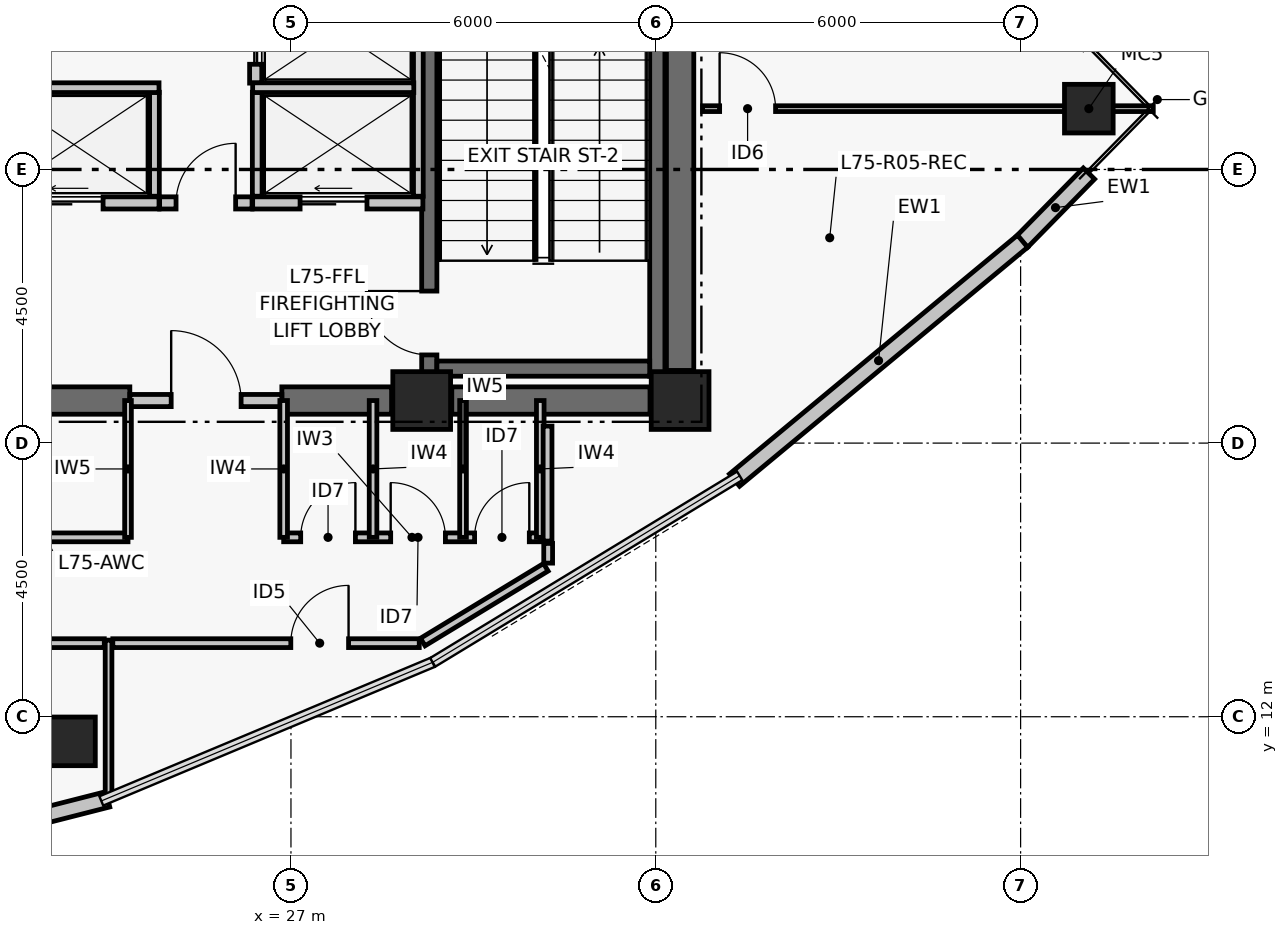
"""IFC4 building model, lengths in metres.
Left out: names, types, materials, properties, quantities, classifications, styles, units other than length and angle.
Written with IfcOpenShell. Run it as: python <this file> out.ifc"""

import sys

from ifc_helpers import new_model, si_unit, direction, frame, frame_2d, origin, origin_2d, place, context, subcontext, project, spatial, rectangle, hollow_rectangle, extrude, element, fill, save


model = new_model("IFC4")
c1 = context("Model", 3, precision=1e-05, world=origin(), true_north=direction((0.0, 1.0)))
c2 = subcontext(c1, "Body", "Model", "MODEL_VIEW")
j1 = project(units=[si_unit("LENGTHUNIT", "METRE"), si_unit("PLANEANGLEUNIT", "RADIAN")], contexts=[c1])
p1 = place(None, origin())
s1 = spatial("IfcSite", under=j1, at=p1, CompositionType="ELEMENT")
p2 = place(p1, origin())
s2 = spatial("IfcBuilding", under=s1, at=p2, CompositionType="ELEMENT")
p3 = place(p2, frame((0.0, 0.0, 295.5)))
s3 = spatial("IfcBuildingStorey", under=s2, at=p3, CompositionType="ELEMENT", Elevation=295.5)
for number, where, z_axis, x_axis in (
    (1, (29.15, 17.2, 0.0), (0.0, 0.0, 1.0), (1.0, 0.0, 0.0)),
    (2, (33.4, 17.2, 0.0), (0.0, 0.0, 1.0), (1.0, 0.0, 0.0)),
):
    element("IfcColumn", number, at=place(p3, frame(where, z_axis=z_axis, x_axis=x_axis)), inside=s3, PredefinedType="COLUMN", context=c2, shape_type="SweptSolid", body=[
        extrude(rectangle(XDim=0.95, YDim=0.95, at=origin_2d()), origin(), (0.0, 0.0, 1.0), 3.72),
    ])
p4 = place(p3, frame((22.545, 17.2, 0.0), z_axis=(0.0, 0.0, 1.0), x_axis=(1.0, 0.0, 0.0)))
e3 = element("IfcWall", 3, at=p4, inside=s3, PredefinedType="SHEAR", context=c2, shape_type="SweptSolid", body=[
    extrude(rectangle(XDim=1.805, YDim=0.45, at=frame_2d((0.903, 0.0))), origin(), (0.0, 0.0, 1.0), 3.44),
])
p5 = place(p3, frame((26.85, 17.2, 0.0), z_axis=(0.0, 0.0, 1.0), x_axis=(1.0, 0.0, 0.0)))
e4 = element("IfcWall", 4, at=p5, inside=s3, PredefinedType="SHEAR", context=c2, shape_type="SweptSolid", body=[
    extrude(rectangle(XDim=1.805, YDim=0.45, at=frame_2d((0.902, 0.0))), origin(), (0.0, 0.0, 1.0), 3.44),
])
p6 = place(p3, frame((29.645, 17.2, 0.0), z_axis=(0.0, 0.0, 1.0), x_axis=(1.0, 0.0, 0.0)))
e5 = element("IfcWall", 5, at=p6, inside=s3, PredefinedType="SHEAR", context=c2, shape_type="SweptSolid", body=[
    extrude(rectangle(XDim=3.26, YDim=0.45, at=frame_2d((1.63, 0.0))), origin(), (0.0, 0.0, 1.0), 3.44),
])
p7 = place(p3, frame((33.4, 17.695, 0.0), z_axis=(0.0, 0.0, 1.0), x_axis=(0.0, 1.0, 0.0)))
e6 = element("IfcWall", 6, at=p7, inside=s3, PredefinedType="SHEAR", context=c2, shape_type="SweptSolid", body=[
    extrude(rectangle(XDim=8.61, YDim=0.45, at=frame_2d((4.305, 0.0))), origin(), (0.0, 0.0, 1.0), 3.44),
])
p8 = place(p3, frame((29.275, 17.6, 0.0), z_axis=(0.0, 0.0, 1.0), x_axis=(0.0, 1.0, 0.0)))
e7 = element("IfcWall", 7, at=p8, inside=s3, PredefinedType="SHEAR", context=c2, shape_type="SweptSolid", body=[
    extrude(rectangle(XDim=8.8, YDim=0.25, at=frame_2d((4.4, 0.0))), origin(), (0.0, 0.0, 1.0), 3.44),
])
p9 = place(p8, frame((0.35, 0.0, 0.0)))
e8 = element("IfcOpeningElement", 8, at=p9, cuts=e7, PredefinedType="OPENING", context=c2, shape_type="SweptSolid", body=[
    extrude(rectangle(XDim=1.05, YDim=2.08, at=frame_2d((0.525, 1.04))), frame((0.0, 0.135, 0.0), z_axis=(0.0, -1.0, 0.0), x_axis=(1.0, 0.0, 0.0)), (0.0, 0.0, 1.0), 0.27),
])
p10 = place(p3, frame((33.025, 17.6, 0.0), z_axis=(0.0, 0.0, 1.0), x_axis=(0.0, 1.0, 0.0)))
e9 = element("IfcWall", 9, at=p10, inside=s3, PredefinedType="SHEAR", context=c2, shape_type="SweptSolid", body=[
    extrude(rectangle(XDim=8.8, YDim=0.25, at=frame_2d((4.4, 0.0))), origin(), (0.0, 0.0, 1.0), 3.44),
])
p11 = place(p3, frame((29.4, 17.725, 0.0), z_axis=(0.0, 0.0, 1.0), x_axis=(1.0, 0.0, 0.0)))
e10 = element("IfcWall", 10, at=p11, inside=s3, PredefinedType="SHEAR", context=c2, shape_type="SweptSolid", body=[
    extrude(rectangle(XDim=3.5, YDim=0.25, at=frame_2d((1.75, 0.0))), origin(), (0.0, 0.0, 1.0), 3.44),
])
for number, where, z_axis, x_axis in (
    (11, (40.122, 22.0, 0.0), (0.0, 0.0, 1.0), (1.0, 0.0, 0.0)),
    (12, (23.382, 11.595, 0.0), (0.0, 0.0, 1.0), (1.0, 0.0, 0.0)),
):
    element("IfcColumn", number, at=place(p3, frame(where, z_axis=z_axis, x_axis=x_axis)), inside=s3, PredefinedType="COLUMN", context=c2, shape_type="SweptSolid", body=[
        extrude(hollow_rectangle(XDim=0.8, YDim=0.8, WallThickness=0.035, at=origin_2d()), origin(), (0.0, 0.0, 1.0), 3.72),
    ])
p12 = place(p3, frame((40.124, 20.933, 0.0), z_axis=(0.0, 0.0, 1.0), x_axis=(-0.700470648387, -0.71368121087, 0.0)))
e13 = element("IfcWall", 13, at=p12, inside=s3, PredefinedType="PARTITIONING", context=c2, shape_type="SweptSolid", body=[
    extrude(rectangle(XDim=1.571, YDim=0.26, at=frame_2d((0.785, 0.0))), origin(), (0.0, 0.0, 1.0), 3.44),
])
p13 = place(p3, frame((23.988, 10.642, 0.0), z_axis=(0.0, 0.0, 1.0), x_axis=(-0.968988278672, -0.247106689096, 0.0)))
e14 = element("IfcWall", 14, at=p13, inside=s3, PredefinedType="PARTITIONING", context=c2, shape_type="SweptSolid", body=[
    extrude(rectangle(XDim=6.154, YDim=0.26, at=frame_2d((3.077, 0.0))), origin(), (0.0, 0.0, 1.0), 3.44),
])
p14 = place(p3, frame((39.032, 19.82, 0.0), z_axis=(0.0, 0.0, 1.0), x_axis=(-0.769779830138, -0.638309496337, 0.0)))
e15 = element("IfcWall", 15, at=p14, inside=s3, PredefinedType="PARTITIONING", context=c2, shape_type="SweptSolid", body=[
    extrude(rectangle(XDim=6.154, YDim=0.26, at=frame_2d((3.077, 0.0))), origin(), (0.0, 0.0, 1.0), 3.44),
])
p15 = place(p3, frame((24.35, 17.2, 0.0), z_axis=(0.0, 0.0, 1.0), x_axis=(1.0, 0.0, 0.0)))
e16 = element("IfcWall", 16, at=p15, inside=s3, PredefinedType="PARTITIONING", context=c2, shape_type="SweptSolid", body=[
    extrude(rectangle(XDim=2.5, YDim=0.2, at=frame_2d((1.25, 0.0))), origin(), (0.0, 0.0, 1.0), 2.57),
])
p16 = place(p15, frame((0.68, 0.0, 0.0)))
e17 = element("IfcOpeningElement", 17, at=p16, cuts=e16, PredefinedType="OPENING", context=c2, shape_type="SweptSolid", body=[
    extrude(rectangle(XDim=1.15, YDim=2.08, at=frame_2d((0.575, 1.04))), frame((0.0, 0.11, 0.0), z_axis=(0.0, -1.0, 0.0), x_axis=(1.0, 0.0, 0.0)), (0.0, 0.0, 1.0), 0.22),
])
p17 = place(p3, frame((24.84, 20.45, 0.0), z_axis=(0.0, 0.0, 1.0), x_axis=(1.0, 0.0, 0.0)))
e18 = element("IfcWall", 18, at=p17, inside=s3, PredefinedType="PARTITIONING", context=c2, shape_type="SweptSolid", body=[
    extrude(rectangle(XDim=1.52, YDim=0.2, at=frame_2d((0.76, 0.0))), origin(), (0.0, 0.0, 1.0), 3.44),
])
p18 = place(p17, frame((0.27, 0.0, 0.0)))
e19 = element("IfcOpeningElement", 19, at=p18, cuts=e18, PredefinedType="OPENING", context=c2, shape_type="SweptSolid", body=[
    extrude(rectangle(XDim=0.98, YDim=2.06, at=frame_2d((0.49, 1.03))), frame((0.0, 0.11, 0.0), z_axis=(0.0, -1.0, 0.0), x_axis=(1.0, 0.0, 0.0)), (0.0, 0.0, 1.0), 0.22),
])
p19 = place(p3, frame((22.03, 20.45, 0.0), z_axis=(0.0, 0.0, 1.0), x_axis=(1.0, 0.0, 0.0)))
e20 = element("IfcWall", 20, at=p19, inside=s3, PredefinedType="PARTITIONING", context=c2, shape_type="SweptSolid", body=[
    extrude(rectangle(XDim=2.8, YDim=0.2, at=frame_2d((1.4, 0.0))), origin(), (0.0, 0.0, 1.0), 3.44),
])
p20 = place(p19, frame((0.78, 0.0, 0.0)))
e21 = element("IfcOpeningElement", 21, at=p20, cuts=e20, PredefinedType="OPENING", context=c2, shape_type="SweptSolid", body=[
    extrude(rectangle(XDim=1.1, YDim=2.08, at=frame_2d((0.55, 1.04))), frame((0.0, 0.11, 0.0), z_axis=(0.0, -1.0, 0.0), x_axis=(1.0, 0.0, 0.0)), (0.0, 0.0, 1.0), 0.22),
])
p21 = place(p3, frame((26.37, 20.45, 0.0), z_axis=(0.0, 0.0, 1.0), x_axis=(1.0, 0.0, 0.0)))
e22 = element("IfcWall", 22, at=p21, inside=s3, PredefinedType="PARTITIONING", context=c2, shape_type="SweptSolid", body=[
    extrude(rectangle(XDim=2.8, YDim=0.2, at=frame_2d((1.4, 0.0))), origin(), (0.0, 0.0, 1.0), 3.44),
])
p22 = place(p21, frame((0.78, 0.0, 0.0)))
e23 = element("IfcOpeningElement", 23, at=p22, cuts=e22, PredefinedType="OPENING", context=c2, shape_type="SweptSolid", body=[
    extrude(rectangle(XDim=1.1, YDim=2.08, at=frame_2d((0.55, 1.04))), frame((0.0, 0.11, 0.0), z_axis=(0.0, -1.0, 0.0), x_axis=(1.0, 0.0, 0.0)), (0.0, 0.0, 1.0), 0.22),
])
p23 = place(p3, frame((26.42, 22.42, 0.0), z_axis=(0.0, 0.0, 1.0), x_axis=(0.0, 1.0, 0.0)))
e24 = element("IfcWall", 24, at=p23, inside=s3, PredefinedType="PARTITIONING", context=c2, shape_type="SweptSolid", body=[
    extrude(rectangle(XDim=1.72, YDim=0.2, at=frame_2d((0.86, 0.0))), origin(), (0.0, 0.0, 1.0), 3.44),
])
p24 = place(p23, frame((0.31, 0.0, 0.0)))
e25 = element("IfcOpeningElement", 25, at=p24, cuts=e24, PredefinedType="OPENING", context=c2, shape_type="SweptSolid", body=[
    extrude(rectangle(XDim=1.1, YDim=2.08, at=frame_2d((0.55, 1.04))), frame((0.0, 0.11, 0.0), z_axis=(0.0, -1.0, 0.0), x_axis=(1.0, 0.0, 0.0)), (0.0, 0.0, 1.0), 0.22),
])
p25 = place(p3, frame((24.755, 20.56, 0.0), z_axis=(0.0, 0.0, 1.0), x_axis=(0.0, 1.0, 0.0)))
e26 = element("IfcWall", 26, at=p25, inside=s3, PredefinedType="PARTITIONING", context=c2, shape_type="SweptSolid", body=[
    extrude(rectangle(XDim=1.71, YDim=0.16, at=frame_2d((0.855, 0.0))), origin(), (0.0, 0.0, 1.0), 3.44),
])
p26 = place(p3, frame((22.18, 22.345, 0.0), z_axis=(0.0, 0.0, 1.0), x_axis=(1.0, 0.0, 0.0)))
e27 = element("IfcWall", 27, at=p26, inside=s3, PredefinedType="PARTITIONING", context=c2, shape_type="SweptSolid", body=[
    extrude(rectangle(XDim=2.65, YDim=0.16, at=frame_2d((1.325, 0.0))), origin(), (0.0, 0.0, 1.0), 3.44),
])
p27 = place(p3, frame((29.095, 20.56, 0.0), z_axis=(0.0, 0.0, 1.0), x_axis=(0.0, 1.0, 0.0)))
e28 = element("IfcWall", 28, at=p27, inside=s3, PredefinedType="PARTITIONING", context=c2, shape_type="SweptSolid", body=[
    extrude(rectangle(XDim=3.58, YDim=0.16, at=frame_2d((1.79, 0.0))), origin(), (0.0, 0.0, 1.0), 3.44),
])
p28 = place(p3, frame((26.445, 20.56, 0.0), z_axis=(0.0, 0.0, 1.0), x_axis=(0.0, 1.0, 0.0)))
e29 = element("IfcWall", 29, at=p28, inside=s3, PredefinedType="PARTITIONING", context=c2, shape_type="SweptSolid", body=[
    extrude(rectangle(XDim=1.71, YDim=0.16, at=frame_2d((0.855, 0.0))), origin(), (0.0, 0.0, 1.0), 3.44),
])
p29 = place(p3, frame((26.37, 22.345, 0.0), z_axis=(0.0, 0.0, 1.0), x_axis=(1.0, 0.0, 0.0)))
e30 = element("IfcWall", 30, at=p29, inside=s3, PredefinedType="PARTITIONING", context=c2, shape_type="SweptSolid", body=[
    extrude(rectangle(XDim=2.65, YDim=0.16, at=frame_2d((1.325, 0.0))), origin(), (0.0, 0.0, 1.0), 3.44),
])
p30 = place(p3, frame((19.1, 14.95, 0.0), z_axis=(0.0, 0.0, 1.0), x_axis=(1.0, 0.0, 0.0)))
e31 = element("IfcWall", 31, at=p30, inside=s3, PredefinedType="PARTITIONING", context=c2, shape_type="SweptSolid", body=[
    extrude(rectangle(XDim=5.22, YDim=0.145, at=frame_2d((2.61, 0.0))), origin(), (0.0, 0.0, 1.0), 2.17),
])
p31 = place(p30, frame((0.2, 0.0, 0.0)))
e32 = element("IfcOpeningElement", 32, at=p31, cuts=e31, PredefinedType="OPENING", context=c2, shape_type="SweptSolid", body=[
    extrude(rectangle(XDim=0.9, YDim=2.02, at=frame_2d((0.45, 1.01))), frame((0.0, 0.083, 0.0), z_axis=(0.0, -1.0, 0.0), x_axis=(1.0, 0.0, 0.0)), (0.0, 0.0, 1.0), 0.165),
])
p32 = place(p30, frame((2.785, 0.0, 0.0)))
e33 = element("IfcOpeningElement", 33, at=p32, cuts=e31, PredefinedType="OPENING", context=c2, shape_type="SweptSolid", body=[
    extrude(rectangle(XDim=0.95, YDim=2.06, at=frame_2d((0.475, 1.03))), frame((0.0, 0.083, 0.0), z_axis=(0.0, -1.0, 0.0), x_axis=(1.0, 0.0, 0.0)), (0.0, 0.0, 1.0), 0.165),
])
p33 = place(p3, frame((26.88, 14.95, 0.0), z_axis=(0.0, 0.0, 1.0), x_axis=(1.0, 0.0, 0.0)))
e34 = element("IfcWall", 34, at=p33, inside=s3, PredefinedType="PARTITIONING", context=c2, shape_type="SweptSolid", body=[
    extrude(rectangle(XDim=4.22, YDim=0.145, at=frame_2d((2.11, 0.0))), origin(), (0.0, 0.0, 1.0), 2.92),
])
p34 = place(p33, frame((0.28, 0.0, 0.0)))
e35 = element("IfcOpeningElement", 35, at=p34, cuts=e34, PredefinedType="OPENING", context=c2, shape_type="SweptSolid", body=[
    extrude(rectangle(XDim=0.9, YDim=2.02, at=frame_2d((0.45, 1.01))), frame((0.0, 0.083, 0.0), z_axis=(0.0, -1.0, 0.0), x_axis=(1.0, 0.0, 0.0)), (0.0, 0.0, 1.0), 0.165),
])
p35 = place(p33, frame((1.76, 0.0, 0.0)))
e36 = element("IfcOpeningElement", 36, at=p35, cuts=e34, PredefinedType="OPENING", context=c2, shape_type="SweptSolid", body=[
    extrude(rectangle(XDim=0.9, YDim=2.02, at=frame_2d((0.45, 1.01))), frame((0.0, 0.083, 0.0), z_axis=(0.0, -1.0, 0.0), x_axis=(1.0, 0.0, 0.0)), (0.0, 0.0, 1.0), 0.165),
])
p36 = place(p33, frame((3.14, 0.0, 0.0)))
e37 = element("IfcOpeningElement", 37, at=p36, cuts=e34, PredefinedType="OPENING", context=c2, shape_type="SweptSolid", body=[
    extrude(rectangle(XDim=0.9, YDim=2.02, at=frame_2d((0.45, 1.01))), frame((0.0, 0.083, 0.0), z_axis=(0.0, -1.0, 0.0), x_axis=(1.0, 0.0, 0.0)), (0.0, 0.0, 1.0), 0.165),
])
p37 = place(p3, frame((24.32, 14.95, 0.0), z_axis=(0.0, 0.0, 1.0), x_axis=(0.0, 1.0, 0.0)))
e38 = element("IfcWall", 38, at=p37, inside=s3, PredefinedType="PARTITIONING", context=c2, shape_type="SweptSolid", body=[
    extrude(rectangle(XDim=2.25, YDim=0.11, at=frame_2d((1.125, 0.0))), origin(), (0.0, 0.0, 1.0), 2.57),
])
for number, where, z_axis, x_axis in (
    (39, (26.88, 14.95, 0.0), (0.0, 0.0, 1.0), (0.0, 1.0, 0.0)),
    (40, (28.35, 14.95, 0.0), (0.0, 0.0, 1.0), (0.0, 1.0, 0.0)),
):
    element("IfcWall", number, at=place(p3, frame(where, z_axis=z_axis, x_axis=x_axis)), inside=s3, PredefinedType="PARTITIONING", context=c2, shape_type="SweptSolid", body=[
        extrude(rectangle(XDim=2.25, YDim=0.125, at=frame_2d((1.125, 0.0))), origin(), (0.0, 0.0, 1.0), 2.57),
    ])
p38 = place(p3, frame((29.83, 14.95, 0.0), z_axis=(0.0, 0.0, 1.0), x_axis=(0.0, 1.0, 0.0)))
e41 = element("IfcWall", 41, at=p38, inside=s3, PredefinedType="PARTITIONING", context=c2, shape_type="SweptSolid", body=[
    extrude(rectangle(XDim=2.25, YDim=0.11, at=frame_2d((1.125, 0.0))), origin(), (0.0, 0.0, 1.0), 2.57),
])
p39 = place(p3, frame((31.1, 14.95, 0.0), z_axis=(0.0, 0.0, 1.0), x_axis=(0.0, 1.0, 0.0)))
e42 = element("IfcWall", 42, at=p39, inside=s3, PredefinedType="PARTITIONING", context=c2, shape_type="SweptSolid", body=[
    extrude(rectangle(XDim=2.25, YDim=0.125, at=frame_2d((1.125, 0.0))), origin(), (0.0, 0.0, 1.0), 2.57),
])
p40 = place(p3, frame((17.54, 13.21, 0.0), z_axis=(0.0, 0.0, 1.0), x_axis=(1.0, 0.0, 0.0)))
e43 = element("IfcWall", 43, at=p40, inside=s3, PredefinedType="PARTITIONING", context=c2, shape_type="SweptSolid", body=[
    extrude(rectangle(XDim=6.39, YDim=0.145, at=frame_2d((3.195, 0.0))), origin(), (0.0, 0.0, 1.0), 2.17),
])
p41 = place(p40, frame((1.508, 0.0, 0.0)))
e44 = element("IfcOpeningElement", 44, at=p41, cuts=e43, PredefinedType="OPENING", context=c2, shape_type="SweptSolid", body=[
    extrude(rectangle(XDim=0.92, YDim=2.05, at=frame_2d((0.46, 1.025))), frame((0.0, 0.083, 0.0), z_axis=(0.0, -1.0, 0.0), x_axis=(1.0, 0.0, 0.0)), (0.0, 0.0, 1.0), 0.165),
])
p42 = place(p3, frame((24.07, 13.21, 0.0), z_axis=(0.0, 0.0, 1.0), x_axis=(1.0, 0.0, 0.0)))
e45 = element("IfcWall", 45, at=p42, inside=s3, PredefinedType="PARTITIONING", context=c2, shape_type="SweptSolid", body=[
    extrude(rectangle(XDim=5.04, YDim=0.145, at=frame_2d((2.52, 0.0))), origin(), (0.0, 0.0, 1.0), 2.92),
])
p43 = place(p42, frame((2.927, 0.0, 0.0)))
e46 = element("IfcOpeningElement", 46, at=p43, cuts=e45, PredefinedType="OPENING", context=c2, shape_type="SweptSolid", body=[
    extrude(rectangle(XDim=0.95, YDim=2.06, at=frame_2d((0.475, 1.03))), frame((0.0, 0.083, 0.0), z_axis=(0.0, -1.0, 0.0), x_axis=(1.0, 0.0, 0.0)), (0.0, 0.0, 1.0), 0.165),
])
p44 = place(p3, frame((29.168, 13.229, 0.0), z_axis=(0.0, 0.0, 1.0), x_axis=(0.854678044033, 0.519158396876, 0.0)))
e47 = element("IfcWall", 47, at=p44, inside=s3, PredefinedType="PARTITIONING", context=c2, shape_type="SweptSolid", body=[
    extrude(rectangle(XDim=2.368, YDim=0.145, at=frame_2d((1.184, 0.0))), origin(), (0.0, 0.0, 1.0), 3.44),
])
p45 = place(p3, frame((31.23, 14.526, 0.0), z_axis=(0.0, 0.0, 1.0), x_axis=(0.0, 1.0, 0.0)))
e48 = element("IfcWall", 48, at=p45, inside=s3, PredefinedType="PARTITIONING", context=c2, shape_type="SweptSolid", body=[
    extrude(rectangle(XDim=0.324, YDim=0.145, at=frame_2d((0.162, 0.0))), origin(), (0.0, 0.0, 1.0), 3.44),
])
p46 = place(p3, frame((31.22, 14.889, 0.0), z_axis=(0.0, 0.0, 1.0), x_axis=(0.0, 1.0, 0.0)))
e49 = element("IfcWall", 49, at=p46, inside=s3, PredefinedType="PARTITIONING", context=c2, shape_type="SweptSolid", body=[
    extrude(rectangle(XDim=1.891, YDim=0.145, at=frame_2d((0.946, 0.0))), origin(), (0.0, 0.0, 1.0), 2.57),
])
p47 = place(p3, frame((24.0, 10.654, 0.0), z_axis=(0.0, 0.0, 1.0), x_axis=(0.0, 1.0, 0.0)))
e50 = element("IfcWall", 50, at=p47, inside=s3, PredefinedType="PARTITIONING", context=c2, shape_type="SweptSolid", body=[
    extrude(rectangle(XDim=2.606, YDim=0.11, at=frame_2d((1.303, 0.0))), origin(), (0.0, 0.0, 1.0), 2.92),
])
p48 = place(p3, frame((33.77, 22.0, 0.0), z_axis=(0.0, 0.0, 1.0), x_axis=(1.0, 0.0, 0.0)))
e51 = element("IfcWall", 51, at=p48, inside=s3, PredefinedType="PARTITIONING", context=c2, shape_type="SweptSolid", body=[
    extrude(rectangle(XDim=7.412, YDim=0.095, at=frame_2d((3.706, 0.0))), origin(), (0.0, 0.0, 1.0), 2.17),
])
p49 = place(p48, frame((0.28, 0.0, 0.0)))
e52 = element("IfcOpeningElement", 52, at=p49, cuts=e51, PredefinedType="OPENING", context=c2, shape_type="SweptSolid", body=[
    extrude(rectangle(XDim=0.92, YDim=2.05, at=frame_2d((0.46, 1.025))), frame((0.0, 0.057, 0.0), z_axis=(0.0, -1.0, 0.0), x_axis=(1.0, 0.0, 0.0)), (0.0, 0.0, 1.0), 0.115),
])
p50 = place(p9, origin())
e53 = element("IfcDoor", 53, at=p50, inside=s3, OperationType="SINGLE_SWING_RIGHT", PredefinedType="DOOR", context=c2, shape_type="SweptSolid", body=[
    extrude(rectangle(XDim=1.05, YDim=2.08, at=frame_2d((0.525, 1.04))), frame((0.0, 0.025, 0.0), z_axis=(0.0, -1.0, 0.0), x_axis=(1.0, 0.0, 0.0)), (0.0, 0.0, 1.0), 0.05),
])
fill(e8, e53)
p51 = place(p16, origin())
e54 = element("IfcDoor", 54, at=p51, inside=s3, OperationType="SINGLE_SWING_LEFT", PredefinedType="DOOR", context=c2, shape_type="SweptSolid", body=[
    extrude(rectangle(XDim=1.15, YDim=2.08, at=frame_2d((0.575, 1.04))), frame((0.0, 0.025, 0.0), z_axis=(0.0, -1.0, 0.0), x_axis=(1.0, 0.0, 0.0)), (0.0, 0.0, 1.0), 0.05),
])
fill(e17, e54)
p52 = place(p18, origin())
e55 = element("IfcDoor", 55, at=p52, inside=s3, OperationType="SINGLE_SWING_RIGHT", PredefinedType="DOOR", context=c2, shape_type="SweptSolid", body=[
    extrude(rectangle(XDim=0.98, YDim=2.06, at=frame_2d((0.49, 1.03))), frame((0.0, 0.025, 0.0), z_axis=(0.0, -1.0, 0.0), x_axis=(1.0, 0.0, 0.0)), (0.0, 0.0, 1.0), 0.05),
])
fill(e19, e55)
p53 = place(p20, origin())
e56 = element("IfcDoor", 56, at=p53, inside=s3, OperationType="DOUBLE_DOOR_SLIDING", PredefinedType="DOOR", context=c2, shape_type="SweptSolid", body=[
    extrude(rectangle(XDim=1.1, YDim=2.08, at=frame_2d((0.55, 1.04))), frame((0.0, 0.025, 0.0), z_axis=(0.0, -1.0, 0.0), x_axis=(1.0, 0.0, 0.0)), (0.0, 0.0, 1.0), 0.05),
])
fill(e21, e56)
p54 = place(p22, origin())
e57 = element("IfcDoor", 57, at=p54, inside=s3, OperationType="DOUBLE_DOOR_SLIDING", PredefinedType="DOOR", context=c2, shape_type="SweptSolid", body=[
    extrude(rectangle(XDim=1.1, YDim=2.08, at=frame_2d((0.55, 1.04))), frame((0.0, 0.025, 0.0), z_axis=(0.0, -1.0, 0.0), x_axis=(1.0, 0.0, 0.0)), (0.0, 0.0, 1.0), 0.05),
])
fill(e23, e57)
p55 = place(p24, origin())
e58 = element("IfcDoor", 58, at=p55, inside=s3, OperationType="DOUBLE_DOOR_SLIDING", PredefinedType="DOOR", context=c2, shape_type="SweptSolid", body=[
    extrude(rectangle(XDim=1.1, YDim=2.08, at=frame_2d((0.55, 1.04))), frame((0.0, 0.025, 0.0), z_axis=(0.0, -1.0, 0.0), x_axis=(1.0, 0.0, 0.0)), (0.0, 0.0, 1.0), 0.05),
])
fill(e25, e58)
p56 = place(p34, origin())
e59 = element("IfcDoor", 59, at=p56, inside=s3, OperationType="SINGLE_SWING_RIGHT", PredefinedType="DOOR", context=c2, shape_type="SweptSolid", body=[
    extrude(rectangle(XDim=0.9, YDim=2.02, at=frame_2d((0.45, 1.01))), frame((0.0, 0.025, 0.0), z_axis=(0.0, -1.0, 0.0), x_axis=(1.0, 0.0, 0.0)), (0.0, 0.0, 1.0), 0.05),
])
fill(e35, e59)
p57 = place(p35, origin())
e60 = element("IfcDoor", 60, at=p57, inside=s3, OperationType="SINGLE_SWING_LEFT", PredefinedType="DOOR", context=c2, shape_type="SweptSolid", body=[
    extrude(rectangle(XDim=0.9, YDim=2.02, at=frame_2d((0.45, 1.01))), frame((0.0, 0.025, 0.0), z_axis=(0.0, -1.0, 0.0), x_axis=(1.0, 0.0, 0.0)), (0.0, 0.0, 1.0), 0.05),
])
fill(e36, e60)
p58 = place(p36, origin())
e61 = element("IfcDoor", 61, at=p58, inside=s3, OperationType="SINGLE_SWING_RIGHT", PredefinedType="DOOR", context=c2, shape_type="SweptSolid", body=[
    extrude(rectangle(XDim=0.9, YDim=2.02, at=frame_2d((0.45, 1.01))), frame((0.0, 0.025, 0.0), z_axis=(0.0, -1.0, 0.0), x_axis=(1.0, 0.0, 0.0)), (0.0, 0.0, 1.0), 0.05),
])
fill(e37, e61)
p59 = place(p43, origin())
e62 = element("IfcDoor", 62, at=p59, inside=s3, OperationType="SINGLE_SWING_RIGHT", PredefinedType="DOOR", context=c2, shape_type="SweptSolid", body=[
    extrude(rectangle(XDim=0.95, YDim=2.06, at=frame_2d((0.475, 1.03))), frame((0.0, 0.025, 0.0), z_axis=(0.0, -1.0, 0.0), x_axis=(1.0, 0.0, 0.0)), (0.0, 0.0, 1.0), 0.05),
])
fill(e46, e62)
p60 = place(p49, origin())
e63 = element("IfcDoor", 63, at=p60, inside=s3, OperationType="SINGLE_SWING_LEFT", PredefinedType="DOOR", context=c2, shape_type="SweptSolid", body=[
    extrude(rectangle(XDim=0.92, YDim=2.05, at=frame_2d((0.46, 1.025))), frame((0.0, 0.025, 0.0), z_axis=(0.0, -1.0, 0.0), x_axis=(1.0, 0.0, 0.0)), (0.0, 0.0, 1.0), 0.05),
])
fill(e52, e63)
save(model, sys.argv[1])
